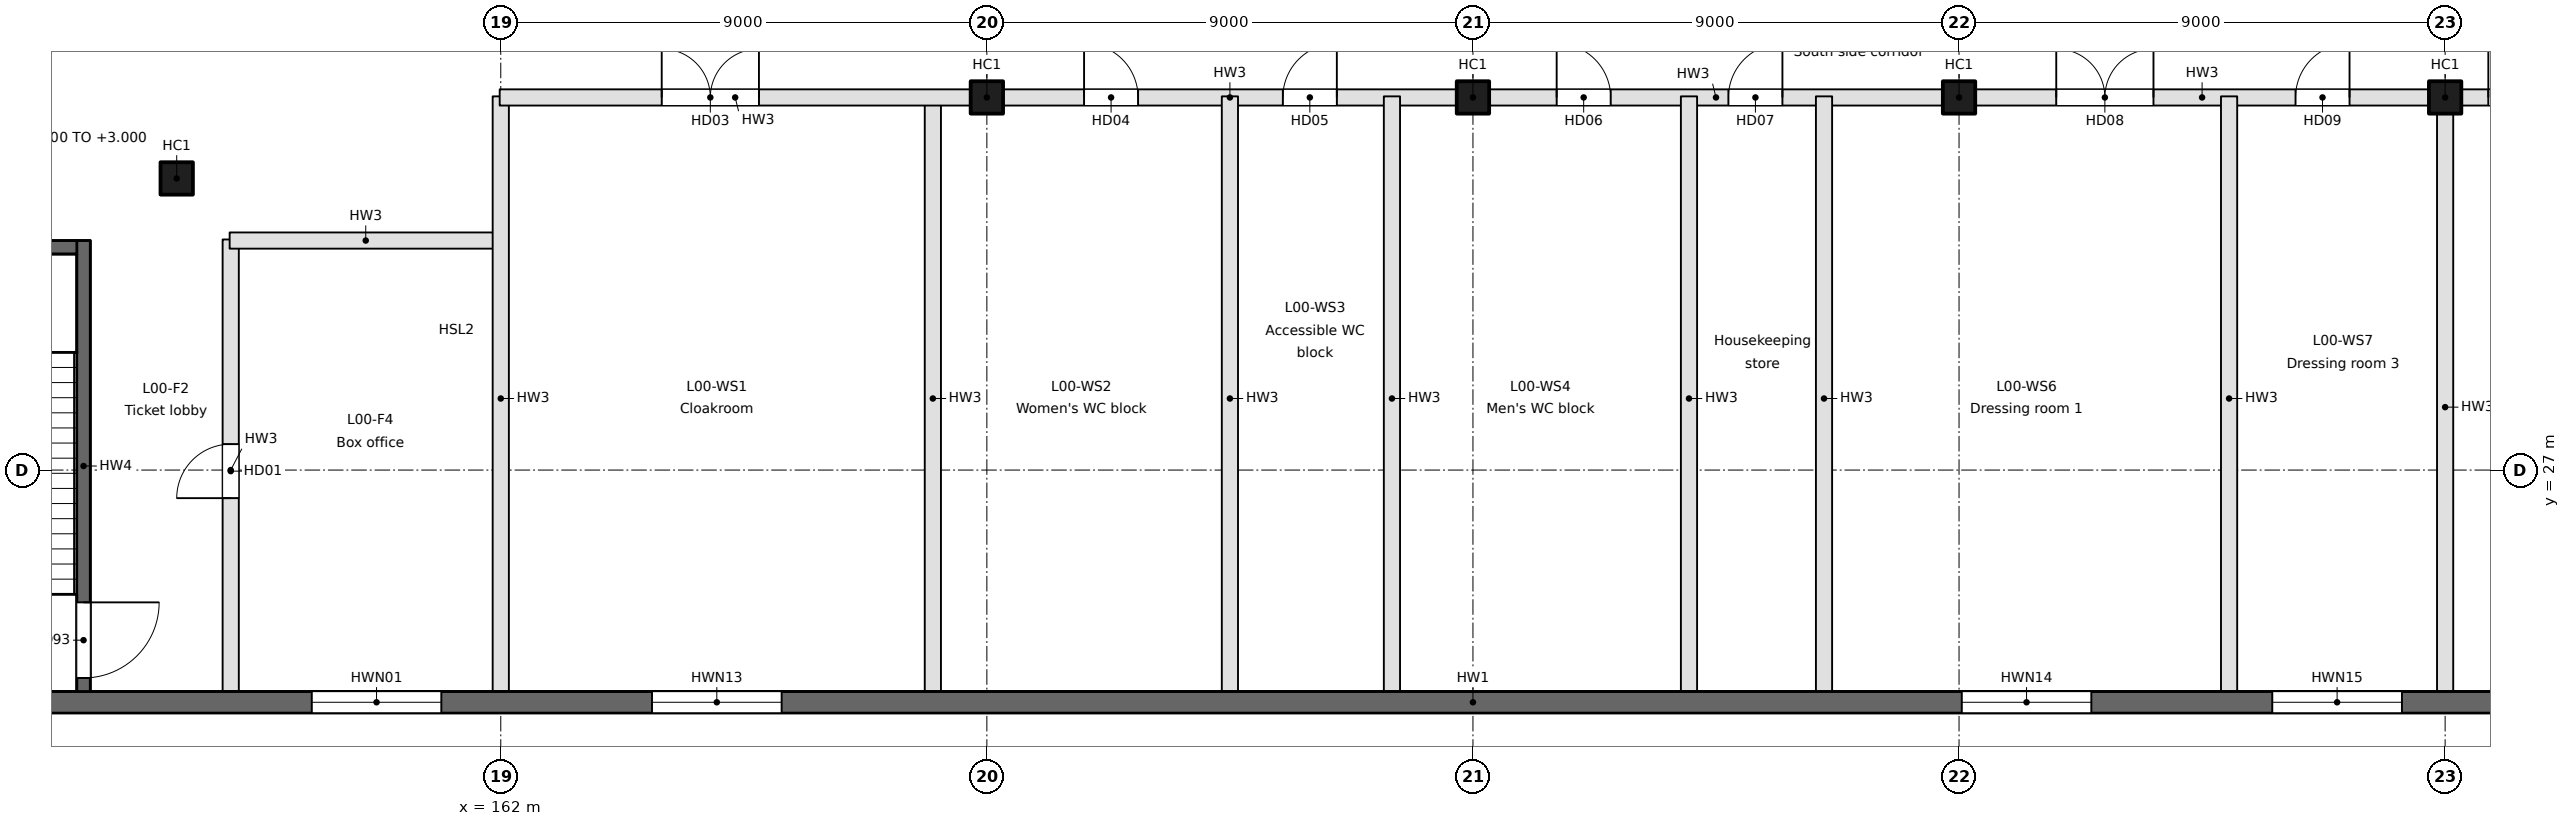
"""IFC4 building model, lengths in metres.
Left out: names, types, materials, properties, quantities, classifications, styles, units other than length and angle.
Written with IfcOpenShell. Run it as: python <this file> out.ifc"""

import sys

from ifc_helpers import new_model, si_unit, direction, frame, frame_2d, origin, origin_2d, place, context, subcontext, project, spatial, rectangle, extrude, element, fill, save


model = new_model("IFC4")
c1 = context("Model", 3, precision=1e-05, world=origin(), true_north=direction((0.0, 1.0)))
c2 = subcontext(c1, "Body", "Model", "MODEL_VIEW")
j1 = project(units=[si_unit("LENGTHUNIT", "METRE"), si_unit("PLANEANGLEUNIT", "RADIAN")], contexts=[c1])
p1 = place(None, origin())
s1 = spatial("IfcSite", under=j1, at=p1, CompositionType="ELEMENT")
p2 = place(p1, origin())
s2 = spatial("IfcBuilding", under=s1, at=p2, CompositionType="ELEMENT")
p3 = place(p2, origin())
s3 = spatial("IfcBuildingStorey", under=s2, at=p3, CompositionType="ELEMENT", Elevation=0.0)
for number, where, z_axis, x_axis in (
    (1, (171.0, 33.9, -1.8), (0.0, 0.0, 1.0), (1.0, 0.0, 0.0)),
    (2, (180.0, 33.9, -1.8), (0.0, 0.0, 1.0), (1.0, 0.0, 0.0)),
    (3, (189.0, 33.9, -1.8), (0.0, 0.0, 1.0), (1.0, 0.0, 0.0)),
    (4, (198.0, 33.9, -1.8), (0.0, 0.0, 1.0), (1.0, 0.0, 0.0)),
    (5, (156.0, 32.4, -1.8), (0.0, 0.0, 1.0), (1.0, 0.0, 0.0)),
):
    element("IfcColumn", number, at=place(p3, frame(where, z_axis=z_axis, x_axis=x_axis)), inside=s3, PredefinedType="COLUMN", context=c2, shape_type="SweptSolid", body=[
        extrude(rectangle(XDim=0.6, YDim=0.6, at=origin_2d()), origin(), (0.0, 0.0, 1.0), 7.8),
    ])
p4 = place(p3, frame((209.6, 22.7, -1.8), z_axis=(0.0, 0.0, 1.0), x_axis=(-1.0, 0.0, 0.0)))
e6 = element("IfcWall", 6, at=p4, inside=s3, PredefinedType="SOLIDWALL", context=c2, shape_type="SweptSolid", body=[
    extrude(rectangle(XDim=59.2, YDim=0.4, at=frame_2d((29.6, 0.0))), origin(), (0.0, 0.0, 1.0), 7.45),
])
p5 = place(p4, frame((56.325, 0.0, 1.8)))
e7 = element("IfcOpeningElement", 7, at=p5, cuts=e6, PredefinedType="OPENING", context=c2, shape_type="SweptSolid", body=[
    extrude(rectangle(XDim=2.0, YDim=2.1, at=frame_2d((1.0, 1.05))), frame((0.0, 0.2, 0.0), z_axis=(0.0, -1.0, 0.0), x_axis=(1.0, 0.0, 0.0)), (0.0, 0.0, 1.0), 0.4),
])
p6 = place(p4, frame((48.7, 0.0, 2.7)))
e8 = element("IfcOpeningElement", 8, at=p6, cuts=e6, PredefinedType="OPENING", context=c2, shape_type="SweptSolid", body=[
    extrude(rectangle(XDim=2.4, YDim=1.8, at=frame_2d((1.2, 0.9))), frame((0.0, 0.2, 0.0), z_axis=(0.0, -1.0, 0.0), x_axis=(1.0, 0.0, 0.0)), (0.0, 0.0, 1.0), 0.4),
])
p7 = place(p4, frame((42.4, 0.0, 2.7)))
e9 = element("IfcOpeningElement", 9, at=p7, cuts=e6, PredefinedType="OPENING", context=c2, shape_type="SweptSolid", body=[
    extrude(rectangle(XDim=2.4, YDim=1.8, at=frame_2d((1.2, 0.9))), frame((0.0, 0.2, 0.0), z_axis=(0.0, -1.0, 0.0), x_axis=(1.0, 0.0, 0.0)), (0.0, 0.0, 1.0), 0.4),
])
p8 = place(p4, frame((18.15, 0.0, 2.7)))
e10 = element("IfcOpeningElement", 10, at=p8, cuts=e6, PredefinedType="OPENING", context=c2, shape_type="SweptSolid", body=[
    extrude(rectangle(XDim=2.4, YDim=1.8, at=frame_2d((1.2, 0.9))), frame((0.0, 0.2, 0.0), z_axis=(0.0, -1.0, 0.0), x_axis=(1.0, 0.0, 0.0)), (0.0, 0.0, 1.0), 0.4),
])
p9 = place(p4, frame((12.4, 0.0, 2.7)))
e11 = element("IfcOpeningElement", 11, at=p9, cuts=e6, PredefinedType="OPENING", context=c2, shape_type="SweptSolid", body=[
    extrude(rectangle(XDim=2.4, YDim=1.8, at=frame_2d((1.2, 0.9))), frame((0.0, 0.2, 0.0), z_axis=(0.0, -1.0, 0.0), x_axis=(1.0, 0.0, 0.0)), (0.0, 0.0, 1.0), 0.4),
])
p10 = place(p4, frame((4.52, 0.0, 2.7)))
e12 = element("IfcOpeningElement", 12, at=p10, cuts=e6, PredefinedType="OPENING", context=c2, shape_type="SweptSolid", body=[
    extrude(rectangle(XDim=2.4, YDim=1.8, at=frame_2d((1.2, 0.9))), frame((0.0, 0.2, 0.0), z_axis=(0.0, -1.0, 0.0), x_axis=(1.0, 0.0, 0.0)), (0.0, 0.0, 1.0), 0.4),
])
p11 = place(p3, frame((157.0, 22.73, 0.0), z_axis=(0.0, 0.0, 1.0), x_axis=(0.0, 1.0, 0.0)))
e13 = element("IfcWall", 13, at=p11, inside=s3, PredefinedType="PARTITIONING", context=c2, shape_type="SweptSolid", body=[
    extrude(rectangle(XDim=8.54, YDim=0.3, at=frame_2d((4.27, 0.0))), origin(), (0.0, 0.0, 1.0), 5.65),
])
p12 = place(p11, frame((3.75, 0.0, 0.0)))
e14 = element("IfcOpeningElement", 14, at=p12, cuts=e13, PredefinedType="OPENING", context=c2, shape_type="SweptSolid", body=[
    extrude(rectangle(XDim=1.0, YDim=2.1, at=frame_2d((0.5, 1.05))), frame((0.0, 0.15, 0.0), z_axis=(0.0, -1.0, 0.0), x_axis=(1.0, 0.0, 0.0)), (0.0, 0.0, 1.0), 0.3),
])
p13 = place(p3, frame((156.98, 31.25, 0.0), z_axis=(0.0, 0.0, 1.0), x_axis=(1.0, 0.0, 0.0)))
e15 = element("IfcWall", 15, at=p13, inside=s3, PredefinedType="PARTITIONING", context=c2, shape_type="SweptSolid", body=[
    extrude(rectangle(XDim=5.04, YDim=0.3, at=frame_2d((2.52, 0.0))), origin(), (0.0, 0.0, 1.0), 5.65),
])
for number, where, z_axis, x_axis in (
    (16, (162.0, 22.73, 0.0), (0.0, 0.0, 1.0), (0.0, 1.0, 0.0)),
    (17, (170.0, 22.73, 0.0), (0.0, 0.0, 1.0), (0.0, 1.0, 0.0)),
):
    element("IfcWall", number, at=place(p3, frame(where, z_axis=z_axis, x_axis=x_axis)), inside=s3, PredefinedType="PARTITIONING", context=c2, shape_type="SweptSolid", body=[
        extrude(rectangle(XDim=11.19, YDim=0.3, at=frame_2d((5.595, 0.0))), origin(), (0.0, 0.0, 1.0), 5.65),
    ])
p14 = place(p3, frame((161.98, 33.9, 0.0), z_axis=(0.0, 0.0, 1.0), x_axis=(1.0, 0.0, 0.0)))
e18 = element("IfcWall", 18, at=p14, inside=s3, PredefinedType="PARTITIONING", context=c2, shape_type="SweptSolid", body=[
    extrude(rectangle(XDim=8.72, YDim=0.3, at=frame_2d((4.36, 0.0))), origin(), (0.0, 0.0, 1.0), 5.65),
])
p15 = place(p14, frame((3.0, 0.0, 0.0)))
e19 = element("IfcOpeningElement", 19, at=p15, cuts=e18, PredefinedType="OPENING", context=c2, shape_type="SweptSolid", body=[
    extrude(rectangle(XDim=1.8, YDim=2.1, at=frame_2d((0.9, 1.05))), frame((0.0, 0.15, 0.0), z_axis=(0.0, -1.0, 0.0), x_axis=(1.0, 0.0, 0.0)), (0.0, 0.0, 1.0), 0.3),
])
p16 = place(p3, frame((171.3, 33.9, 0.0), z_axis=(0.0, 0.0, 1.0), x_axis=(1.0, 0.0, 0.0)))
e20 = element("IfcWall", 20, at=p16, inside=s3, PredefinedType="PARTITIONING", context=c2, shape_type="SweptSolid", body=[
    extrude(rectangle(XDim=8.4, YDim=0.3, at=frame_2d((4.2, 0.0))), origin(), (0.0, 0.0, 1.0), 5.65),
])
p17 = place(p16, frame((1.5, 0.0, 0.0)))
e21 = element("IfcOpeningElement", 21, at=p17, cuts=e20, PredefinedType="OPENING", context=c2, shape_type="SweptSolid", body=[
    extrude(rectangle(XDim=1.0, YDim=2.1, at=frame_2d((0.5, 1.05))), frame((0.0, 0.15, 0.0), z_axis=(0.0, -1.0, 0.0), x_axis=(1.0, 0.0, 0.0)), (0.0, 0.0, 1.0), 0.3),
])
p18 = place(p16, frame((5.18, 0.0, 0.0)))
e22 = element("IfcOpeningElement", 22, at=p18, cuts=e20, PredefinedType="OPENING", context=c2, shape_type="SweptSolid", body=[
    extrude(rectangle(XDim=1.0, YDim=2.1, at=frame_2d((0.5, 1.05))), frame((0.0, 0.15, 0.0), z_axis=(0.0, -1.0, 0.0), x_axis=(1.0, 0.0, 0.0)), (0.0, 0.0, 1.0), 0.3),
])
p19 = place(p3, frame((180.3, 33.9, 0.0), z_axis=(0.0, 0.0, 1.0), x_axis=(1.0, 0.0, 0.0)))
e23 = element("IfcWall", 23, at=p19, inside=s3, PredefinedType="PARTITIONING", context=c2, shape_type="SweptSolid", body=[
    extrude(rectangle(XDim=8.4, YDim=0.3, at=frame_2d((4.2, 0.0))), origin(), (0.0, 0.0, 1.0), 5.65),
])
p20 = place(p19, frame((1.25, 0.0, 0.0)))
e24 = element("IfcOpeningElement", 24, at=p20, cuts=e23, PredefinedType="OPENING", context=c2, shape_type="SweptSolid", body=[
    extrude(rectangle(XDim=1.0, YDim=2.1, at=frame_2d((0.5, 1.05))), frame((0.0, 0.15, 0.0), z_axis=(0.0, -1.0, 0.0), x_axis=(1.0, 0.0, 0.0)), (0.0, 0.0, 1.0), 0.3),
])
p21 = place(p19, frame((4.43, 0.0, 0.0)))
e25 = element("IfcOpeningElement", 25, at=p21, cuts=e23, PredefinedType="OPENING", context=c2, shape_type="SweptSolid", body=[
    extrude(rectangle(XDim=1.0, YDim=2.1, at=frame_2d((0.5, 1.05))), frame((0.0, 0.15, 0.0), z_axis=(0.0, -1.0, 0.0), x_axis=(1.0, 0.0, 0.0)), (0.0, 0.0, 1.0), 0.3),
])
p22 = place(p3, frame((189.3, 33.9, 0.0), z_axis=(0.0, 0.0, 1.0), x_axis=(1.0, 0.0, 0.0)))
e26 = element("IfcWall", 26, at=p22, inside=s3, PredefinedType="PARTITIONING", context=c2, shape_type="SweptSolid", body=[
    extrude(rectangle(XDim=8.4, YDim=0.3, at=frame_2d((4.2, 0.0))), origin(), (0.0, 0.0, 1.0), 5.65),
])
p23 = place(p22, frame((1.5, 0.0, 0.0)))
e27 = element("IfcOpeningElement", 27, at=p23, cuts=e26, PredefinedType="OPENING", context=c2, shape_type="SweptSolid", body=[
    extrude(rectangle(XDim=1.8, YDim=2.1, at=frame_2d((0.9, 1.05))), frame((0.0, 0.15, 0.0), z_axis=(0.0, -1.0, 0.0), x_axis=(1.0, 0.0, 0.0)), (0.0, 0.0, 1.0), 0.3),
])
p24 = place(p22, frame((5.93, 0.0, 0.0)))
e28 = element("IfcOpeningElement", 28, at=p24, cuts=e26, PredefinedType="OPENING", context=c2, shape_type="SweptSolid", body=[
    extrude(rectangle(XDim=1.0, YDim=2.1, at=frame_2d((0.5, 1.05))), frame((0.0, 0.15, 0.0), z_axis=(0.0, -1.0, 0.0), x_axis=(1.0, 0.0, 0.0)), (0.0, 0.0, 1.0), 0.3),
])
p25 = place(p3, frame((198.3, 33.9, 0.0), z_axis=(0.0, 0.0, 1.0), x_axis=(1.0, 0.0, 0.0)))
e29 = element("IfcWall", 29, at=p25, inside=s3, PredefinedType="PARTITIONING", context=c2, shape_type="SweptSolid", body=[
    extrude(rectangle(XDim=2.82, YDim=0.3, at=frame_2d((1.41, 0.0))), origin(), (0.0, 0.0, 1.0), 5.65),
])
p26 = place(p25, frame((0.5, 0.0, 0.0)))
e30 = element("IfcOpeningElement", 30, at=p26, cuts=e29, PredefinedType="OPENING", context=c2, shape_type="SweptSolid", body=[
    extrude(rectangle(XDim=1.8, YDim=2.1, at=frame_2d((0.9, 1.05))), frame((0.0, 0.15, 0.0), z_axis=(0.0, -1.0, 0.0), x_axis=(1.0, 0.0, 0.0)), (0.0, 0.0, 1.0), 0.3),
])
for number, where, z_axis, x_axis in (
    (31, (175.5, 22.73, 0.0), (0.0, 0.0, 1.0), (0.0, 1.0, 0.0)),
    (32, (178.5, 22.73, 0.0), (0.0, 0.0, 1.0), (0.0, 1.0, 0.0)),
    (33, (184.0, 22.73, 0.0), (0.0, 0.0, 1.0), (0.0, 1.0, 0.0)),
    (34, (186.5, 22.73, 0.0), (0.0, 0.0, 1.0), (0.0, 1.0, 0.0)),
    (35, (194.0, 22.73, 0.0), (0.0, 0.0, 1.0), (0.0, 1.0, 0.0)),
):
    element("IfcWall", number, at=place(p3, frame(where, z_axis=z_axis, x_axis=x_axis)), inside=s3, PredefinedType="PARTITIONING", context=c2, shape_type="SweptSolid", body=[
        extrude(rectangle(XDim=11.19, YDim=0.3, at=frame_2d((5.595, 0.0))), origin(), (0.0, 0.0, 1.0), 5.65),
    ])
p27 = place(p3, frame((198.0, 22.73, 0.0), z_axis=(0.0, 0.0, 1.0), x_axis=(0.0, 1.0, 0.0)))
e36 = element("IfcWall", 36, at=p27, inside=s3, PredefinedType="PARTITIONING", context=c2, shape_type="SweptSolid", body=[
    extrude(rectangle(XDim=10.87, YDim=0.3, at=frame_2d((5.435, 0.0))), origin(), (0.0, 0.0, 1.0), 5.65),
])
p28 = place(p3, frame((154.275, 31.25, -1.8), z_axis=(0.0, 0.0, 1.0), x_axis=(0.0, -1.0, 0.0)))
e37 = element("IfcWall", 37, at=p28, inside=s3, PredefinedType="SOLIDWALL", context=c2, shape_type="SweptSolid", body=[
    extrude(rectangle(XDim=8.35, YDim=0.25, at=frame_2d((4.175, 0.0))), origin(), (0.0, 0.0, 1.0), 7.45),
])
p29 = place(p28, frame((6.7, 0.0, 1.8)))
e38 = element("IfcOpeningElement", 38, at=p29, cuts=e37, PredefinedType="OPENING", context=c2, shape_type="SweptSolid", body=[
    extrude(rectangle(XDim=1.4, YDim=2.1, at=frame_2d((0.7, 1.05))), frame((0.0, 0.125, 0.0), z_axis=(0.0, -1.0, 0.0), x_axis=(1.0, 0.0, 0.0)), (0.0, 0.0, 1.0), 0.25),
])
p30 = place(p3, frame((150.4, 31.125, -1.8), z_axis=(0.0, 0.0, 1.0), x_axis=(1.0, 0.0, 0.0)))
e39 = element("IfcWall", 39, at=p30, inside=s3, PredefinedType="SOLIDWALL", context=c2, shape_type="SweptSolid", body=[
    extrude(rectangle(XDim=3.75, YDim=0.25, at=frame_2d((1.875, 0.0))), origin(), (0.0, 0.0, 1.0), 7.45),
])
p31 = place(p12, origin())
e40 = element("IfcDoor", 40, at=p31, inside=s3, OperationType="SINGLE_SWING_LEFT", PredefinedType="DOOR", context=c2, shape_type="SweptSolid", body=[
    extrude(rectangle(XDim=1.0, YDim=2.1, at=frame_2d((0.5, 1.05))), frame((0.0, 0.025, 0.0), z_axis=(0.0, -1.0, 0.0), x_axis=(1.0, 0.0, 0.0)), (0.0, 0.0, 1.0), 0.05),
])
fill(e14, e40)
p32 = place(p15, origin())
e41 = element("IfcDoor", 41, at=p32, inside=s3, OperationType="DOUBLE_DOOR_SINGLE_SWING", PredefinedType="DOOR", context=c2, shape_type="SweptSolid", body=[
    extrude(rectangle(XDim=1.8, YDim=2.1, at=frame_2d((0.9, 1.05))), frame((0.0, 0.025, 0.0), z_axis=(0.0, -1.0, 0.0), x_axis=(1.0, 0.0, 0.0)), (0.0, 0.0, 1.0), 0.05),
])
fill(e19, e41)
p33 = place(p17, origin())
e42 = element("IfcDoor", 42, at=p33, inside=s3, OperationType="SINGLE_SWING_LEFT", PredefinedType="DOOR", context=c2, shape_type="SweptSolid", body=[
    extrude(rectangle(XDim=1.0, YDim=2.1, at=frame_2d((0.5, 1.05))), frame((0.0, 0.025, 0.0), z_axis=(0.0, -1.0, 0.0), x_axis=(1.0, 0.0, 0.0)), (0.0, 0.0, 1.0), 0.05),
])
fill(e21, e42)
p34 = place(p18, origin())
e43 = element("IfcDoor", 43, at=p34, inside=s3, OperationType="SINGLE_SWING_RIGHT", PredefinedType="DOOR", context=c2, shape_type="SweptSolid", body=[
    extrude(rectangle(XDim=1.0, YDim=2.1, at=frame_2d((0.5, 1.05))), frame((0.0, 0.025, 0.0), z_axis=(0.0, -1.0, 0.0), x_axis=(1.0, 0.0, 0.0)), (0.0, 0.0, 1.0), 0.05),
])
fill(e22, e43)
p35 = place(p20, origin())
e44 = element("IfcDoor", 44, at=p35, inside=s3, OperationType="SINGLE_SWING_LEFT", PredefinedType="DOOR", context=c2, shape_type="SweptSolid", body=[
    extrude(rectangle(XDim=1.0, YDim=2.1, at=frame_2d((0.5, 1.05))), frame((0.0, 0.025, 0.0), z_axis=(0.0, -1.0, 0.0), x_axis=(1.0, 0.0, 0.0)), (0.0, 0.0, 1.0), 0.05),
])
fill(e24, e44)
p36 = place(p21, origin())
e45 = element("IfcDoor", 45, at=p36, inside=s3, OperationType="SINGLE_SWING_RIGHT", PredefinedType="DOOR", context=c2, shape_type="SweptSolid", body=[
    extrude(rectangle(XDim=1.0, YDim=2.1, at=frame_2d((0.5, 1.05))), frame((0.0, 0.025, 0.0), z_axis=(0.0, -1.0, 0.0), x_axis=(1.0, 0.0, 0.0)), (0.0, 0.0, 1.0), 0.05),
])
fill(e25, e45)
p37 = place(p23, origin())
e46 = element("IfcDoor", 46, at=p37, inside=s3, OperationType="DOUBLE_DOOR_SINGLE_SWING", PredefinedType="DOOR", context=c2, shape_type="SweptSolid", body=[
    extrude(rectangle(XDim=1.8, YDim=2.1, at=frame_2d((0.9, 1.05))), frame((0.0, 0.025, 0.0), z_axis=(0.0, -1.0, 0.0), x_axis=(1.0, 0.0, 0.0)), (0.0, 0.0, 1.0), 0.05),
])
fill(e27, e46)
p38 = place(p24, origin())
e47 = element("IfcDoor", 47, at=p38, inside=s3, OperationType="SINGLE_SWING_RIGHT", PredefinedType="DOOR", context=c2, shape_type="SweptSolid", body=[
    extrude(rectangle(XDim=1.0, YDim=2.1, at=frame_2d((0.5, 1.05))), frame((0.0, 0.025, 0.0), z_axis=(0.0, -1.0, 0.0), x_axis=(1.0, 0.0, 0.0)), (0.0, 0.0, 1.0), 0.05),
])
fill(e28, e47)
p39 = place(p26, origin())
e48 = element("IfcDoor", 48, at=p39, inside=s3, OperationType="DOUBLE_DOOR_SINGLE_SWING", PredefinedType="DOOR", context=c2, shape_type="SweptSolid", body=[
    extrude(rectangle(XDim=1.8, YDim=2.1, at=frame_2d((0.9, 1.05))), frame((0.0, 0.025, 0.0), z_axis=(0.0, -1.0, 0.0), x_axis=(1.0, 0.0, 0.0)), (0.0, 0.0, 1.0), 0.05),
])
fill(e30, e48)
p40 = place(p6, origin())
e49 = element("IfcWindow", 49, at=p40, inside=s3, PartitioningType="SINGLE_PANEL", PredefinedType="WINDOW", context=c2, shape_type="SweptSolid", body=[
    extrude(rectangle(XDim=2.4, YDim=1.8, at=frame_2d((1.2, 0.9))), frame((0.0, 0.03, 0.0), z_axis=(0.0, -1.0, 0.0), x_axis=(1.0, 0.0, 0.0)), (0.0, 0.0, 1.0), 0.06),
])
fill(e8, e49)
p41 = place(p7, origin())
e50 = element("IfcWindow", 50, at=p41, inside=s3, PartitioningType="SINGLE_PANEL", PredefinedType="WINDOW", context=c2, shape_type="SweptSolid", body=[
    extrude(rectangle(XDim=2.4, YDim=1.8, at=frame_2d((1.2, 0.9))), frame((0.0, 0.03, 0.0), z_axis=(0.0, -1.0, 0.0), x_axis=(1.0, 0.0, 0.0)), (0.0, 0.0, 1.0), 0.06),
])
fill(e9, e50)
p42 = place(p8, origin())
e51 = element("IfcWindow", 51, at=p42, inside=s3, PartitioningType="SINGLE_PANEL", PredefinedType="WINDOW", context=c2, shape_type="SweptSolid", body=[
    extrude(rectangle(XDim=2.4, YDim=1.8, at=frame_2d((1.2, 0.9))), frame((0.0, 0.03, 0.0), z_axis=(0.0, -1.0, 0.0), x_axis=(1.0, 0.0, 0.0)), (0.0, 0.0, 1.0), 0.06),
])
fill(e10, e51)
p43 = place(p9, origin())
e52 = element("IfcWindow", 52, at=p43, inside=s3, PartitioningType="SINGLE_PANEL", PredefinedType="WINDOW", context=c2, shape_type="SweptSolid", body=[
    extrude(rectangle(XDim=2.4, YDim=1.8, at=frame_2d((1.2, 0.9))), frame((0.0, 0.03, 0.0), z_axis=(0.0, -1.0, 0.0), x_axis=(1.0, 0.0, 0.0)), (0.0, 0.0, 1.0), 0.06),
])
fill(e11, e52)
p44 = place(p29, origin())
e53 = element("IfcDoor", 53, at=p44, inside=s3, OperationType="SINGLE_SWING_LEFT", PredefinedType="DOOR", context=c2, shape_type="SweptSolid", body=[
    extrude(rectangle(XDim=1.4, YDim=2.1, at=frame_2d((0.7, 1.05))), frame((0.0, 0.025, 0.0), z_axis=(0.0, -1.0, 0.0), x_axis=(1.0, 0.0, 0.0)), (0.0, 0.0, 1.0), 0.05),
])
fill(e38, e53)
save(model, sys.argv[1])
